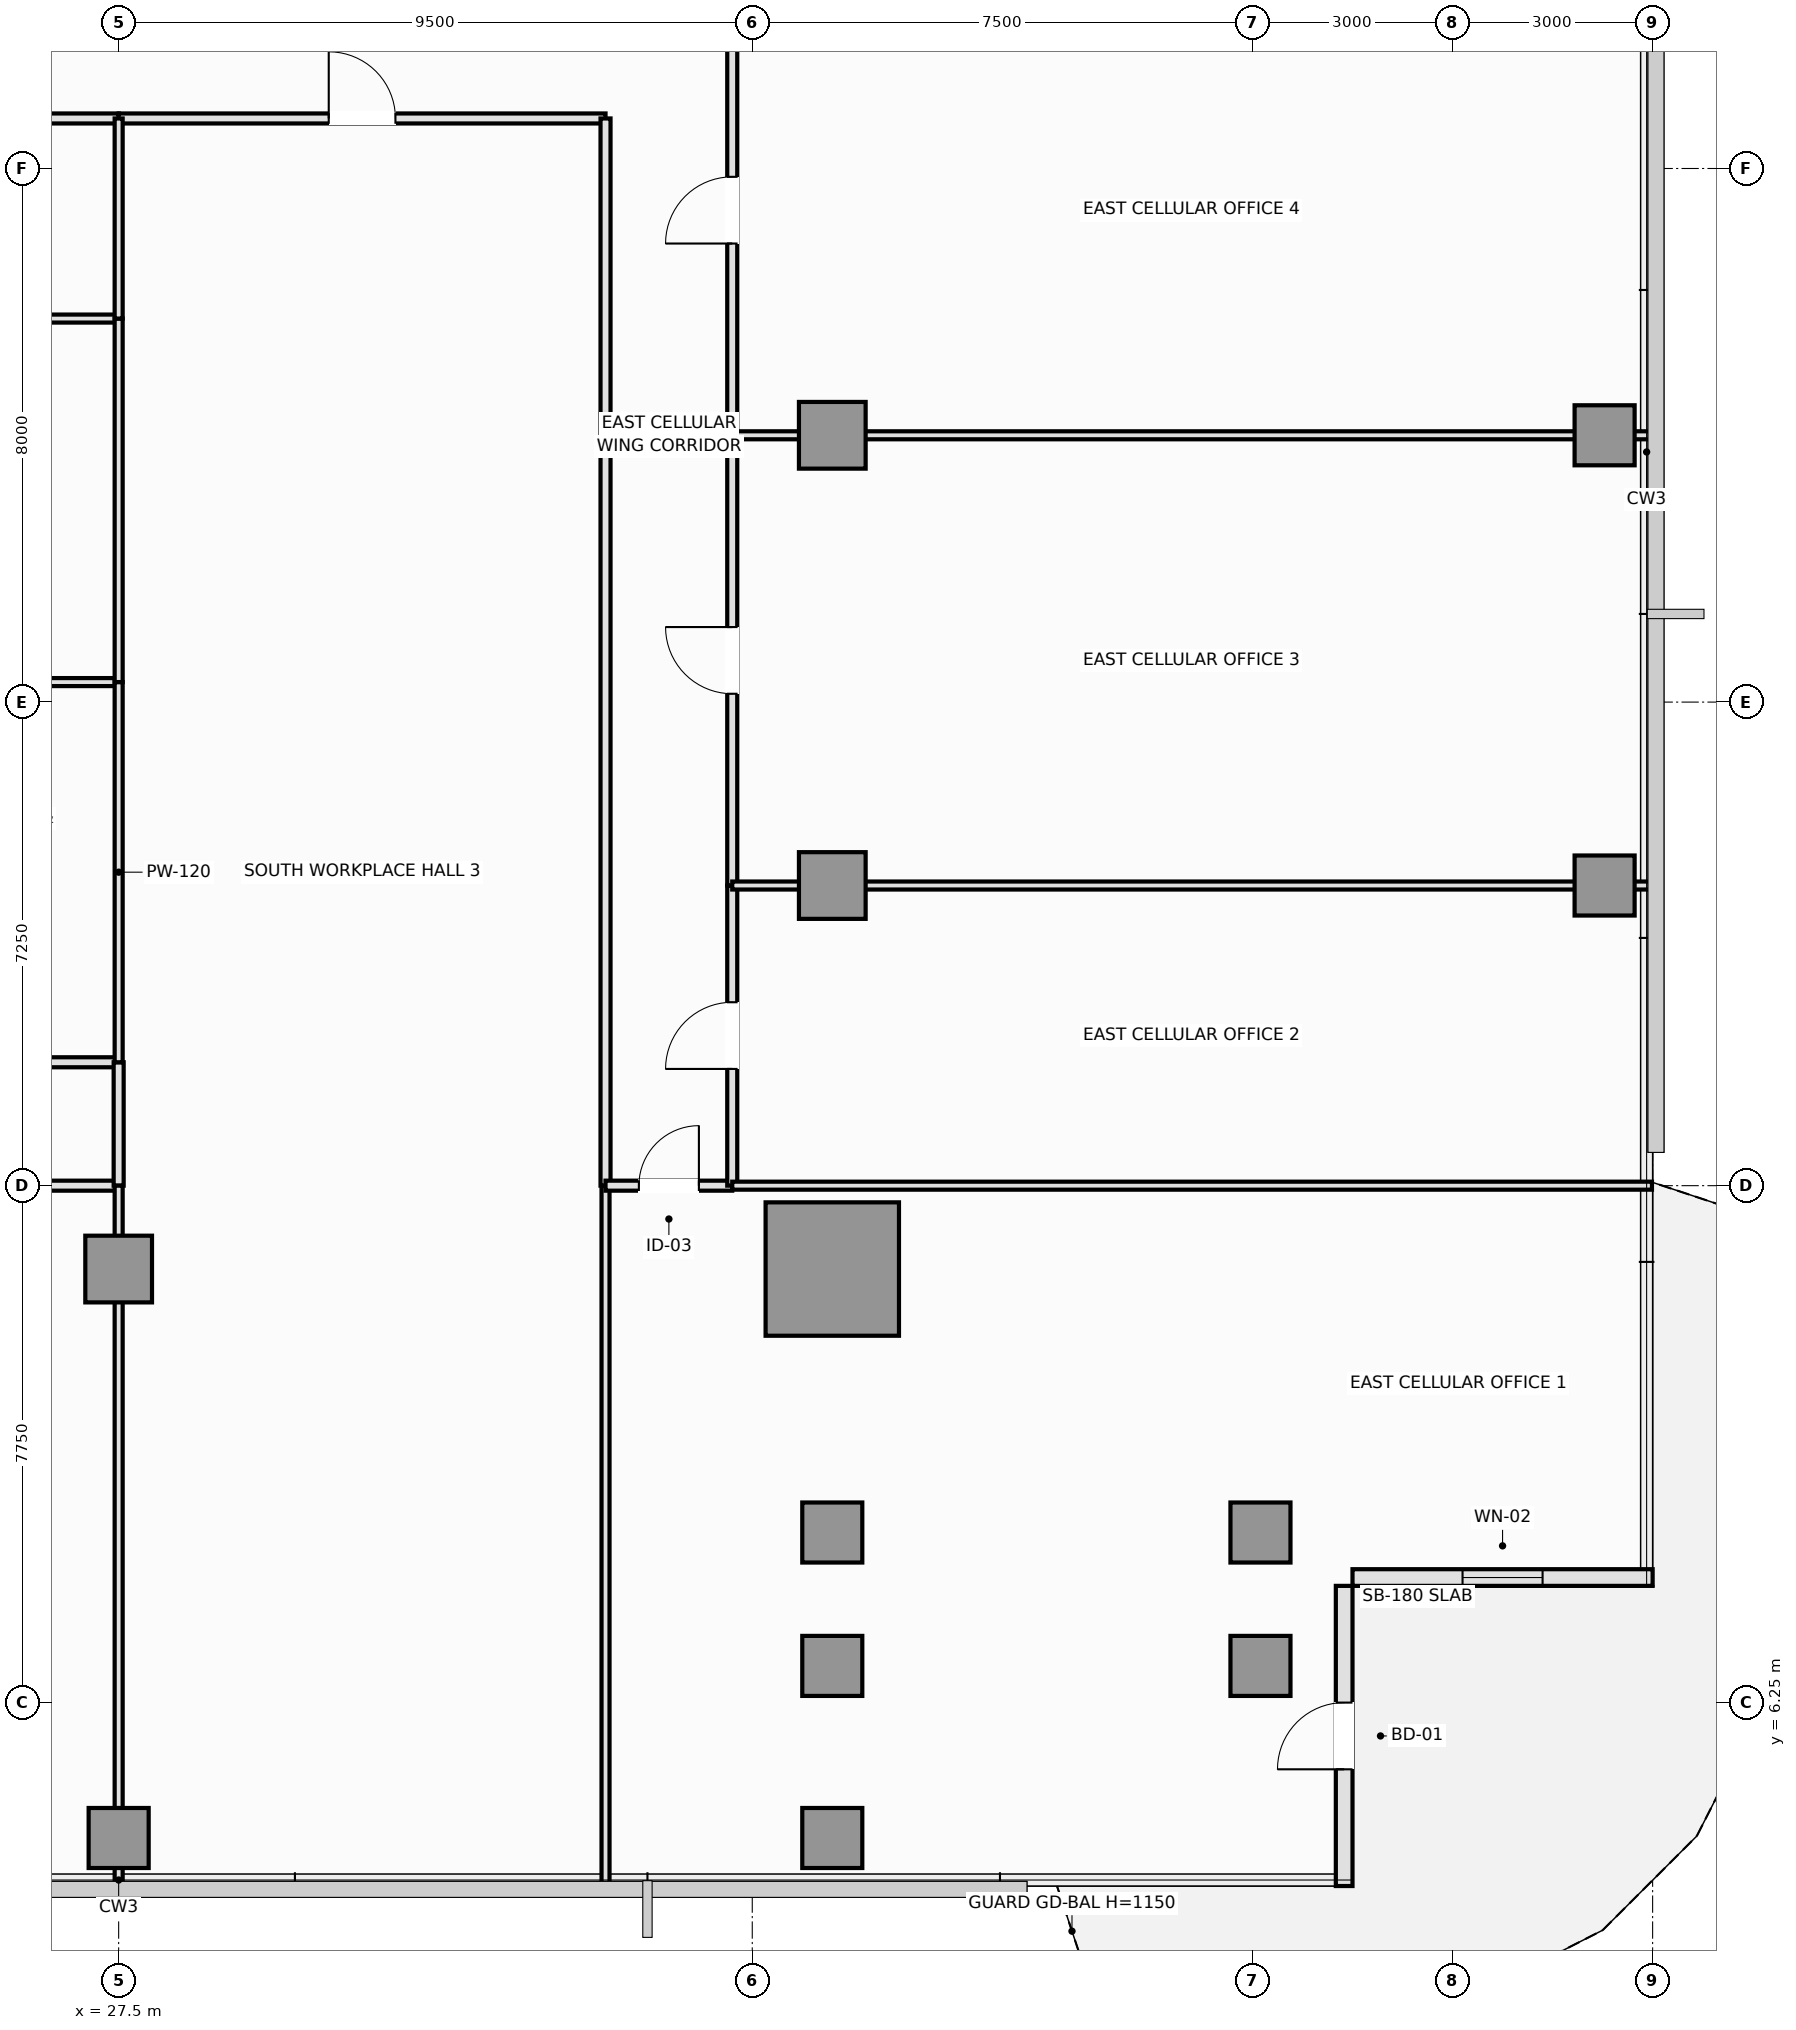
"""IFC4 building model, lengths in metres.
Left out: names, types, materials, properties, quantities, classifications, styles, units other than length and angle.
Written with IfcOpenShell. Run it as: python <this file> out.ifc"""

import sys

from ifc_helpers import new_model, si_unit, direction, frame, frame_2d, origin, origin_2d, place, context, subcontext, project, spatial, rectangle, extrude, element, fill, save


model = new_model("IFC4")
c1 = context("Model", 3, precision=1e-05, world=origin(), true_north=direction((0.0, 1.0)))
c2 = subcontext(c1, "Body", "Model", "MODEL_VIEW")
j1 = project(units=[si_unit("LENGTHUNIT", "METRE"), si_unit("PLANEANGLEUNIT", "RADIAN")], contexts=[c1])
p1 = place(None, origin())
s1 = spatial("IfcSite", under=j1, at=p1, CompositionType="ELEMENT")
p2 = place(p1, origin())
s2 = spatial("IfcBuilding", under=s1, at=p2, CompositionType="ELEMENT")
p3 = place(p2, frame((0.0, 0.0, 148.4)))
s3 = spatial("IfcBuildingStorey", under=s2, at=p3, CompositionType="ELEMENT", Elevation=148.4)
p4 = place(p3, frame((38.2, 12.75, 0.0), z_axis=(0.0, 0.0, 1.0), x_axis=(1.0, 0.0, 0.0)))
e1 = element("IfcColumn", 1, at=p4, inside=s3, PredefinedType="COLUMN", context=c2, shape_type="SweptSolid", body=[
    extrude(rectangle(XDim=2.0, YDim=2.0, at=origin_2d()), origin(), (0.0, 0.0, 1.0), 3.55),
])
for number, where, z_axis, x_axis in (
    (2, (27.5, 12.75, 0.0), (0.0, 0.0, 1.0), (1.0, 0.0, 0.0)),
    (3, (38.2, 18.5, 0.0), (0.0, 0.0, 1.0), (1.0, 0.0, 0.0)),
    (4, (38.2, 25.25, 0.0), (0.0, 0.0, 1.0), (1.0, 0.0, 0.0)),
):
    element("IfcColumn", number, at=place(p3, frame(where, z_axis=z_axis, x_axis=x_axis)), inside=s3, PredefinedType="COLUMN", context=c2, shape_type="SweptSolid", body=[
        extrude(rectangle(XDim=1.0, YDim=1.0, at=origin_2d()), origin(), (0.0, 0.0, 1.0), 3.55),
    ])
for number, where, z_axis, x_axis in (
    (5, (38.2, 6.8, 0.0), (0.0, 0.0, 1.0), (1.0, 0.0, 0.0)),
    (6, (38.2, 8.8, 0.0), (0.0, 0.0, 1.0), (1.0, 0.0, 0.0)),
    (7, (44.62, 6.8, 0.0), (0.0, 0.0, 1.0), (1.0, 0.0, 0.0)),
    (8, (44.62, 8.8, 0.0), (0.0, 0.0, 1.0), (1.0, 0.0, 0.0)),
    (9, (49.78, 18.5, 0.0), (0.0, 0.0, 1.0), (1.0, 0.0, 0.0)),
    (10, (49.78, 25.25, 0.0), (0.0, 0.0, 1.0), (1.0, 0.0, 0.0)),
    (11, (27.5, 4.22, 0.0), (0.0, 0.0, 1.0), (1.0, 0.0, 0.0)),
    (12, (38.2, 4.22, 0.0), (0.0, 0.0, 1.0), (1.0, 0.0, 0.0)),
):
    element("IfcColumn", number, at=place(p3, frame(where, z_axis=z_axis, x_axis=x_axis)), inside=s3, PredefinedType="COLUMN", context=c2, shape_type="SweptSolid", body=[
        extrude(rectangle(XDim=0.9, YDim=0.9, at=origin_2d()), origin(), (0.0, 0.0, 1.0), 3.55),
    ])
p5 = place(p3, frame((45.875, 3.5, 0.0), z_axis=(0.0, 0.0, 1.0), x_axis=(0.0, 1.0, 0.0)))
e13 = element("IfcWall", 13, at=p5, inside=s3, PredefinedType="SOLIDWALL", context=c2, shape_type="SweptSolid", body=[
    extrude(rectangle(XDim=4.5, YDim=0.25, at=frame_2d((2.25, 0.0))), origin(), (0.0, 0.0, 1.0), 3.07),
])
p6 = place(p5, frame((1.75, 0.0, 0.0)))
e14 = element("IfcOpeningElement", 14, at=p6, cuts=e13, PredefinedType="OPENING", context=c2, shape_type="SweptSolid", body=[
    extrude(rectangle(XDim=1.0, YDim=2.2, at=frame_2d((0.5, 1.1))), frame((0.0, 0.135, 0.0), z_axis=(0.0, -1.0, 0.0), x_axis=(1.0, 0.0, 0.0)), (0.0, 0.0, 1.0), 0.27),
])
p7 = place(p3, frame((46.0, 8.125, 0.0), z_axis=(0.0, 0.0, 1.0), x_axis=(1.0, 0.0, 0.0)))
e15 = element("IfcWall", 15, at=p7, inside=s3, PredefinedType="SOLIDWALL", context=c2, shape_type="SweptSolid", body=[
    extrude(rectangle(XDim=4.5, YDim=0.25, at=frame_2d((2.25, 0.0))), origin(), (0.0, 0.0, 1.0), 3.1),
])
p8 = place(p7, frame((1.65, 0.0, 0.9)))
e16 = element("IfcOpeningElement", 16, at=p8, cuts=e15, PredefinedType="OPENING", context=c2, shape_type="SweptSolid", body=[
    extrude(rectangle(XDim=1.2, YDim=1.8, at=frame_2d((0.6, 0.9))), frame((0.0, 0.135, 0.0), z_axis=(0.0, -1.0, 0.0), x_axis=(1.0, 0.0, 0.0)), (0.0, 0.0, 1.0), 0.27),
])
p9 = place(p3, frame((23.2, 30.0, 0.0), z_axis=(0.0, 0.0, 1.0), x_axis=(1.0, 0.0, 0.0)))
e17 = element("IfcWall", 17, at=p9, inside=s3, PredefinedType="PARTITIONING", context=c2, shape_type="SweptSolid", body=[
    extrude(rectangle(XDim=4.3, YDim=0.15, at=frame_2d((2.15, 0.0))), origin(), (0.0, 0.0, 1.0), 3.37),
])
p10 = place(p9, frame((1.65, 0.0, 0.0)))
e18 = element("IfcOpeningElement", 18, at=p10, cuts=e17, PredefinedType="OPENING", context=c2, shape_type="SweptSolid", body=[
    extrude(rectangle(XDim=1.0, YDim=2.15, at=frame_2d((0.5, 1.075))), frame((0.0, 0.085, 0.0), z_axis=(0.0, -1.0, 0.0), x_axis=(1.0, 0.0, 0.0)), (0.0, 0.0, 1.0), 0.17),
])
p11 = place(p3, frame((27.5, 30.0, 0.0), z_axis=(0.0, 0.0, 1.0), x_axis=(1.0, 0.0, 0.0)))
e19 = element("IfcWall", 19, at=p11, inside=s3, PredefinedType="PARTITIONING", context=c2, shape_type="SweptSolid", body=[
    extrude(rectangle(XDim=7.3, YDim=0.15, at=frame_2d((3.65, 0.0))), origin(), (0.0, 0.0, 1.0), 3.37),
])
p12 = place(p11, frame((3.15, 0.0, 0.0)))
e20 = element("IfcOpeningElement", 20, at=p12, cuts=e19, PredefinedType="OPENING", context=c2, shape_type="SweptSolid", body=[
    extrude(rectangle(XDim=1.0, YDim=2.15, at=frame_2d((0.5, 1.075))), frame((0.0, 0.085, 0.0), z_axis=(0.0, -1.0, 0.0), x_axis=(1.0, 0.0, 0.0)), (0.0, 0.0, 1.0), 0.17),
])
p13 = place(p3, frame((23.6, 15.85, 0.0), z_axis=(0.0, 0.0, 1.0), x_axis=(1.0, 0.0, 0.0)))
e21 = element("IfcWall", 21, at=p13, inside=s3, PredefinedType="PARTITIONING", context=c2, shape_type="SweptSolid", body=[
    extrude(rectangle(XDim=3.9, YDim=0.15, at=frame_2d((1.95, 0.0))), origin(), (0.0, 0.0, 1.0), 3.37),
])
p14 = place(p13, frame((1.45, 0.0, 0.0)))
e22 = element("IfcOpeningElement", 22, at=p14, cuts=e21, PredefinedType="OPENING", context=c2, shape_type="SweptSolid", body=[
    extrude(rectangle(XDim=1.0, YDim=2.15, at=frame_2d((0.5, 1.075))), frame((0.0, 0.085, 0.0), z_axis=(0.0, -1.0, 0.0), x_axis=(1.0, 0.0, 0.0)), (0.0, 0.0, 1.0), 0.17),
])
p15 = place(p3, frame((19.95, 14.0, 0.0), z_axis=(0.0, 0.0, 1.0), x_axis=(1.0, 0.0, 0.0)))
e23 = element("IfcWall", 23, at=p15, inside=s3, PredefinedType="PARTITIONING", context=c2, shape_type="SweptSolid", body=[
    extrude(rectangle(XDim=7.55, YDim=0.15, at=frame_2d((3.775, 0.0))), origin(), (0.0, 0.0, 1.0), 3.37),
])
p16 = place(p15, frame((3.275, 0.0, 0.0)))
e24 = element("IfcOpeningElement", 24, at=p16, cuts=e23, PredefinedType="OPENING", context=c2, shape_type="SweptSolid", body=[
    extrude(rectangle(XDim=1.0, YDim=2.15, at=frame_2d((0.5, 1.075))), frame((0.0, 0.085, 0.0), z_axis=(0.0, -1.0, 0.0), x_axis=(1.0, 0.0, 0.0)), (0.0, 0.0, 1.0), 0.17),
])
p17 = place(p3, frame((27.5, 14.0, 0.0), z_axis=(0.0, 0.0, 1.0), x_axis=(0.0, 1.0, 0.0)))
e25 = element("IfcWall", 25, at=p17, inside=s3, PredefinedType="PARTITIONING", context=c2, shape_type="SweptSolid", body=[
    extrude(rectangle(XDim=1.85, YDim=0.15, at=frame_2d((0.925, 0.0))), origin(), (0.0, 0.0, 1.0), 3.37),
])
p18 = place(p3, frame((23.6, 21.55, 0.0), z_axis=(0.0, 0.0, 1.0), x_axis=(1.0, 0.0, 0.0)))
e26 = element("IfcWall", 26, at=p18, inside=s3, PredefinedType="PARTITIONING", context=c2, shape_type="SweptSolid", body=[
    extrude(rectangle(XDim=3.9, YDim=0.12, at=frame_2d((1.95, 0.0))), origin(), (0.0, 0.0, 1.0), 3.37),
])
p19 = place(p3, frame((27.5, 15.85, 0.0), z_axis=(0.0, 0.0, 1.0), x_axis=(0.0, 1.0, 0.0)))
e27 = element("IfcWall", 27, at=p19, inside=s3, PredefinedType="PARTITIONING", context=c2, shape_type="SweptSolid", body=[
    extrude(rectangle(XDim=5.7, YDim=0.12, at=frame_2d((2.85, 0.0))), origin(), (0.0, 0.0, 1.0), 3.37),
])
p20 = place(p3, frame((23.2, 27.0, 0.0), z_axis=(0.0, 0.0, 1.0), x_axis=(1.0, 0.0, 0.0)))
e28 = element("IfcWall", 28, at=p20, inside=s3, PredefinedType="PARTITIONING", context=c2, shape_type="SweptSolid", body=[
    extrude(rectangle(XDim=4.3, YDim=0.12, at=frame_2d((2.15, 0.0))), origin(), (0.0, 0.0, 1.0), 3.37),
])
p21 = place(p3, frame((27.5, 21.55, 0.0), z_axis=(0.0, 0.0, 1.0), x_axis=(0.0, 1.0, 0.0)))
e29 = element("IfcWall", 29, at=p21, inside=s3, PredefinedType="PARTITIONING", context=c2, shape_type="SweptSolid", body=[
    extrude(rectangle(XDim=5.45, YDim=0.12, at=frame_2d((2.725, 0.0))), origin(), (0.0, 0.0, 1.0), 3.37),
])
p22 = place(p3, frame((27.5, 27.0, 0.0), z_axis=(0.0, 0.0, 1.0), x_axis=(0.0, 1.0, 0.0)))
e30 = element("IfcWall", 30, at=p22, inside=s3, PredefinedType="PARTITIONING", context=c2, shape_type="SweptSolid", body=[
    extrude(rectangle(XDim=3.0, YDim=0.12, at=frame_2d((1.5, 0.0))), origin(), (0.0, 0.0, 1.0), 3.37),
])
p23 = place(p3, frame((27.5, 3.51, 0.0), z_axis=(0.0, 0.0, 1.0), x_axis=(0.0, 1.0, 0.0)))
e31 = element("IfcWall", 31, at=p23, inside=s3, PredefinedType="PARTITIONING", context=c2, shape_type="SweptSolid", body=[
    extrude(rectangle(XDim=10.49, YDim=0.12, at=frame_2d((5.245, 0.0))), origin(), (0.0, 0.0, 1.0), 2.87),
])
p24 = place(p3, frame((34.8, 14.0, 0.0), z_axis=(0.0, 0.0, 1.0), x_axis=(0.0, 1.0, 0.0)))
e32 = element("IfcWall", 32, at=p24, inside=s3, PredefinedType="PARTITIONING", context=c2, shape_type="SweptSolid", body=[
    extrude(rectangle(XDim=16.0, YDim=0.15, at=frame_2d((8.0, 0.0))), origin(), (0.0, 0.0, 1.0), 3.37),
])
p25 = place(p3, frame((34.8, 3.51, 0.0), z_axis=(0.0, 0.0, 1.0), x_axis=(0.0, 1.0, 0.0)))
e33 = element("IfcWall", 33, at=p25, inside=s3, PredefinedType="PARTITIONING", context=c2, shape_type="SweptSolid", body=[
    extrude(rectangle(XDim=10.49, YDim=0.12, at=frame_2d((5.245, 0.0))), origin(), (0.0, 0.0, 1.0), 3.37),
])
p26 = place(p3, frame((34.8, 14.0, 0.0), z_axis=(0.0, 0.0, 1.0), x_axis=(1.0, 0.0, 0.0)))
e34 = element("IfcWall", 34, at=p26, inside=s3, PredefinedType="PARTITIONING", context=c2, shape_type="SweptSolid", body=[
    extrude(rectangle(XDim=1.9, YDim=0.15, at=frame_2d((0.95, 0.0))), origin(), (0.0, 0.0, 1.0), 3.37),
])
p27 = place(p26, frame((0.5, 0.0, 0.0)))
e35 = element("IfcOpeningElement", 35, at=p27, cuts=e34, PredefinedType="OPENING", context=c2, shape_type="SweptSolid", body=[
    extrude(rectangle(XDim=0.9, YDim=2.1, at=frame_2d((0.45, 1.05))), frame((0.0, 0.085, 0.0), z_axis=(0.0, -1.0, 0.0), x_axis=(1.0, 0.0, 0.0)), (0.0, 0.0, 1.0), 0.17),
])
p28 = place(p3, frame((36.7, 14.0, 0.0), z_axis=(0.0, 0.0, 1.0), x_axis=(0.0, 1.0, 0.0)))
e36 = element("IfcWall", 36, at=p28, inside=s3, PredefinedType="PARTITIONING", context=c2, shape_type="SweptSolid", body=[
    extrude(rectangle(XDim=4.5, YDim=0.15, at=frame_2d((2.25, 0.0))), origin(), (0.0, 0.0, 1.0), 3.37),
])
p29 = place(p28, frame((1.75, 0.0, 0.0)))
e37 = element("IfcOpeningElement", 37, at=p29, cuts=e36, PredefinedType="OPENING", context=c2, shape_type="SweptSolid", body=[
    extrude(rectangle(XDim=1.0, YDim=2.15, at=frame_2d((0.5, 1.075))), frame((0.0, 0.085, 0.0), z_axis=(0.0, -1.0, 0.0), x_axis=(1.0, 0.0, 0.0)), (0.0, 0.0, 1.0), 0.17),
])
p30 = place(p3, frame((36.7, 18.5, 0.0), z_axis=(0.0, 0.0, 1.0), x_axis=(0.0, 1.0, 0.0)))
e38 = element("IfcWall", 38, at=p30, inside=s3, PredefinedType="PARTITIONING", context=c2, shape_type="SweptSolid", body=[
    extrude(rectangle(XDim=6.75, YDim=0.15, at=frame_2d((3.375, 0.0))), origin(), (0.0, 0.0, 1.0), 3.37),
])
p31 = place(p30, frame((2.875, 0.0, 0.0)))
e39 = element("IfcOpeningElement", 39, at=p31, cuts=e38, PredefinedType="OPENING", context=c2, shape_type="SweptSolid", body=[
    extrude(rectangle(XDim=1.0, YDim=2.15, at=frame_2d((0.5, 1.075))), frame((0.0, 0.085, 0.0), z_axis=(0.0, -1.0, 0.0), x_axis=(1.0, 0.0, 0.0)), (0.0, 0.0, 1.0), 0.17),
])
p32 = place(p3, frame((36.7, 25.25, 0.0), z_axis=(0.0, 0.0, 1.0), x_axis=(0.0, 1.0, 0.0)))
e40 = element("IfcWall", 40, at=p32, inside=s3, PredefinedType="PARTITIONING", context=c2, shape_type="SweptSolid", body=[
    extrude(rectangle(XDim=6.75, YDim=0.15, at=frame_2d((3.375, 0.0))), origin(), (0.0, 0.0, 1.0), 3.37),
])
p33 = place(p32, frame((2.875, 0.0, 0.0)))
e41 = element("IfcOpeningElement", 41, at=p33, cuts=e40, PredefinedType="OPENING", context=c2, shape_type="SweptSolid", body=[
    extrude(rectangle(XDim=1.0, YDim=2.15, at=frame_2d((0.5, 1.075))), frame((0.0, 0.085, 0.0), z_axis=(0.0, -1.0, 0.0), x_axis=(1.0, 0.0, 0.0)), (0.0, 0.0, 1.0), 0.17),
])
p34 = place(p3, frame((36.7, 14.0, 0.0), z_axis=(0.0, 0.0, 1.0), x_axis=(1.0, 0.0, 0.0)))
e42 = element("IfcWall", 42, at=p34, inside=s3, PredefinedType="PARTITIONING", context=c2, shape_type="SweptSolid", body=[
    extrude(rectangle(XDim=13.79, YDim=0.12, at=frame_2d((6.895, 0.0))), origin(), (0.0, 0.0, 1.0), 3.37),
])
for number, where, z_axis, x_axis in (
    (43, (36.7, 18.5, 0.0), (0.0, 0.0, 1.0), (1.0, 0.0, 0.0)),
    (44, (36.7, 25.25, 0.0), (0.0, 0.0, 1.0), (1.0, 0.0, 0.0)),
):
    element("IfcWall", number, at=place(p3, frame(where, z_axis=z_axis, x_axis=x_axis)), inside=s3, PredefinedType="PARTITIONING", context=c2, shape_type="SweptSolid", body=[
        extrude(rectangle(XDim=13.79, YDim=0.12, at=frame_2d((6.895, 0.0))), origin(), (0.0, 0.0, 1.0), 2.77),
    ])
p35 = place(p6, frame((1.0, 0.0, 0.0), z_axis=(0.0, 0.0, 1.0), x_axis=(-1.0, 0.0, 0.0)))
e45 = element("IfcDoor", 45, at=p35, inside=s3, OperationType="SINGLE_SWING_LEFT", PredefinedType="DOOR", context=c2, shape_type="SweptSolid", body=[
    extrude(rectangle(XDim=1.0, YDim=2.2, at=frame_2d((0.5, 1.1))), frame((0.0, 0.025, 0.0), z_axis=(0.0, -1.0, 0.0), x_axis=(1.0, 0.0, 0.0)), (0.0, 0.0, 1.0), 0.05),
])
fill(e14, e45)
p36 = place(p8, origin())
e46 = element("IfcWindow", 46, at=p36, inside=s3, PartitioningType="SINGLE_PANEL", PredefinedType="WINDOW", context=c2, shape_type="SweptSolid", body=[
    extrude(rectangle(XDim=1.2, YDim=1.8, at=frame_2d((0.6, 0.9))), frame((0.0, 0.03, 0.0), z_axis=(0.0, -1.0, 0.0), x_axis=(1.0, 0.0, 0.0)), (0.0, 0.0, 1.0), 0.06),
])
fill(e16, e46)
p37 = place(p12, origin())
e47 = element("IfcDoor", 47, at=p37, inside=s3, OperationType="SINGLE_SWING_LEFT", PredefinedType="DOOR", context=c2, shape_type="SweptSolid", body=[
    extrude(rectangle(XDim=1.0, YDim=2.15, at=frame_2d((0.5, 1.075))), frame((0.0, 0.025, 0.0), z_axis=(0.0, -1.0, 0.0), x_axis=(1.0, 0.0, 0.0)), (0.0, 0.0, 1.0), 0.05),
])
fill(e20, e47)
p38 = place(p27, origin())
e48 = element("IfcDoor", 48, at=p38, inside=s3, OperationType="SINGLE_SWING_RIGHT", PredefinedType="DOOR", context=c2, shape_type="SweptSolid", body=[
    extrude(rectangle(XDim=0.9, YDim=2.1, at=frame_2d((0.45, 1.05))), frame((0.0, 0.025, 0.0), z_axis=(0.0, -1.0, 0.0), x_axis=(1.0, 0.0, 0.0)), (0.0, 0.0, 1.0), 0.05),
])
fill(e35, e48)
p39 = place(p29, origin())
e49 = element("IfcDoor", 49, at=p39, inside=s3, OperationType="SINGLE_SWING_LEFT", PredefinedType="DOOR", context=c2, shape_type="SweptSolid", body=[
    extrude(rectangle(XDim=1.0, YDim=2.15, at=frame_2d((0.5, 1.075))), frame((0.0, 0.025, 0.0), z_axis=(0.0, -1.0, 0.0), x_axis=(1.0, 0.0, 0.0)), (0.0, 0.0, 1.0), 0.05),
])
fill(e37, e49)
p40 = place(p31, origin())
e50 = element("IfcDoor", 50, at=p40, inside=s3, OperationType="SINGLE_SWING_RIGHT", PredefinedType="DOOR", context=c2, shape_type="SweptSolid", body=[
    extrude(rectangle(XDim=1.0, YDim=2.15, at=frame_2d((0.5, 1.075))), frame((0.0, 0.025, 0.0), z_axis=(0.0, -1.0, 0.0), x_axis=(1.0, 0.0, 0.0)), (0.0, 0.0, 1.0), 0.05),
])
fill(e39, e50)
p41 = place(p33, origin())
e51 = element("IfcDoor", 51, at=p41, inside=s3, OperationType="SINGLE_SWING_LEFT", PredefinedType="DOOR", context=c2, shape_type="SweptSolid", body=[
    extrude(rectangle(XDim=1.0, YDim=2.15, at=frame_2d((0.5, 1.075))), frame((0.0, 0.025, 0.0), z_axis=(0.0, -1.0, 0.0), x_axis=(1.0, 0.0, 0.0)), (0.0, 0.0, 1.0), 0.05),
])
fill(e41, e51)
save(model, sys.argv[1])
